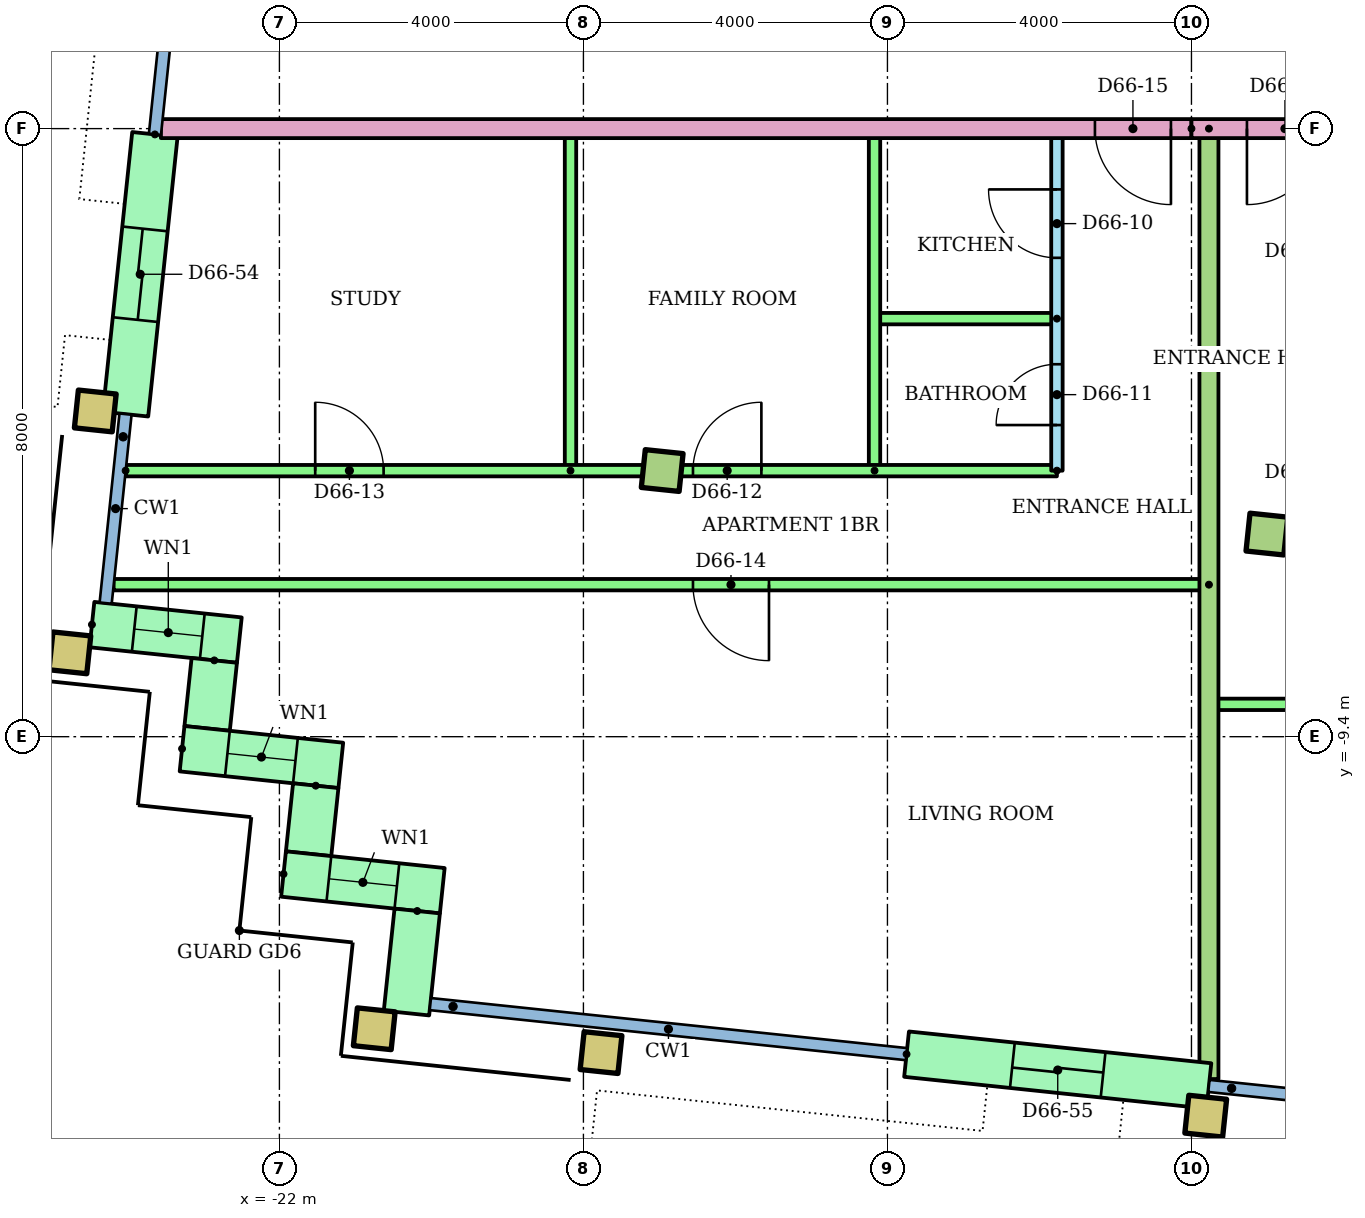
"""IFC4 building model, lengths in metres.
Left out: names, types, materials, properties, quantities, classifications, styles, units other than length and angle.
Written with IfcOpenShell. Run it as: python <this file> out.ifc"""

import sys

from ifc_helpers import new_model, si_unit, direction, frame, frame_2d, origin, origin_2d, place, context, subcontext, project, spatial, rectangle, hollow_rectangle, extrude, element, fill, save


model = new_model("IFC4")
c1 = context("Model", 3, precision=1e-05, world=origin(), true_north=direction((0.0, 1.0)))
c2 = subcontext(c1, "Body", "Model", "MODEL_VIEW")
j1 = project(units=[si_unit("LENGTHUNIT", "METRE"), si_unit("PLANEANGLEUNIT", "RADIAN")], contexts=[c1])
p1 = place(None, origin())
s1 = spatial("IfcSite", under=j1, at=p1, CompositionType="ELEMENT")
p2 = place(p1, origin())
s2 = spatial("IfcBuilding", under=s1, at=p2, CompositionType="ELEMENT")
p3 = place(p2, frame((0.0, 0.0, 256.3)))
s3 = spatial("IfcBuildingStorey", under=s2, at=p3, CompositionType="ELEMENT", Elevation=256.3)
for number, where, z_axis, x_axis in (
    (1, (-20.752, -13.243, 0.0), (0.0, 0.0, 1.0), (0.995, -0.105, 0.0)),
    (2, (-17.768, -13.556, 0.0), (0.0, 0.0, 1.0), (0.995, -0.105, 0.0)),
    (3, (-9.812, -14.392, 0.0), (0.0, 0.0, 1.0), (0.995, -0.105, 0.0)),
    (4, (-24.757, -8.297, 0.0), (0.0, 0.0, 1.0), (0.995, -0.105, 0.0)),
    (5, (-24.423, -5.115, 0.0), (0.0, 0.0, 1.0), (0.995, -0.105, 0.0)),
):
    element("IfcColumn", number, at=place(p3, frame(where, z_axis=z_axis, x_axis=x_axis)), inside=s3, PredefinedType="COLUMN", context=c2, shape_type="SweptSolid", body=[
        extrude(hollow_rectangle(XDim=0.5, YDim=0.5, WallThickness=0.025, at=origin_2d()), origin(), (0.0, 0.0, 1.0), 3.2),
    ])
for number, where, z_axis, x_axis in (
    (6, (-16.964, -5.898, 0.0), (0.0, 0.0, 1.0), (0.995, -0.105, 0.0)),
    (7, (-9.007, -6.735, 0.0), (0.0, 0.0, 1.0), (0.995, -0.105, 0.0)),
):
    element("IfcColumn", number, at=place(p3, frame(where, z_axis=z_axis, x_axis=x_axis)), inside=s3, PredefinedType="COLUMN", context=c2, shape_type="SweptSolid", body=[
        extrude(rectangle(XDim=0.5, YDim=0.5, at=origin_2d()), origin(), (0.0, 0.0, 1.0), 3.2),
    ])
p4 = place(p3, frame((-23.638, -1.476, 0.0), z_axis=(0.0, 0.0, 1.0), x_axis=(-0.104513052986, -0.994523514933, 0.0)))
e8 = element("IfcWall", 8, at=p4, inside=s3, PredefinedType="STANDARD", context=c2, shape_type="SweptSolid", body=[
    extrude(rectangle(XDim=3.7, YDim=0.6, at=frame_2d((1.85, 0.0))), origin(), (0.0, 0.0, 1.0), 2.92),
])
p5 = place(p4, frame((1.25, 0.0, 0.0)))
e9 = element("IfcOpeningElement", 9, at=p5, cuts=e8, PredefinedType="OPENING", context=c2, shape_type="SweptSolid", body=[
    extrude(rectangle(XDim=1.2, YDim=2.1, at=frame_2d((0.6, 1.05))), frame((0.0, 0.31, 0.0), z_axis=(0.0, -1.0, 0.0), x_axis=(1.0, 0.0, 0.0)), (0.0, 0.0, 1.0), 0.62),
])
p6 = place(p3, frame((-24.467, -7.925, 0.0), z_axis=(0.0, 0.0, 1.0), x_axis=(0.994521219184, -0.104534896528, 0.0)))
e10 = element("IfcWall", 10, at=p6, inside=s3, PredefinedType="STANDARD", context=c2, shape_type="SweptSolid", body=[
    extrude(rectangle(XDim=1.95, YDim=0.6, at=frame_2d((0.975, 0.0))), origin(), (0.0, 0.0, 1.0), 2.92),
])
p7 = place(p6, frame((0.56, 0.0, 0.9)))
e11 = element("IfcOpeningElement", 11, at=p7, cuts=e10, PredefinedType="OPENING", context=c2, shape_type="SweptSolid", body=[
    extrude(rectangle(XDim=0.9, YDim=1.5, at=frame_2d((0.45, 0.75))), frame((0.0, 0.31, 0.0), z_axis=(0.0, -1.0, 0.0), x_axis=(1.0, 0.0, 0.0)), (0.0, 0.0, 1.0), 0.62),
])
p8 = place(p3, frame((-22.857, -8.396, 0.0), z_axis=(0.0, 0.0, 1.0), x_axis=(-0.104444712852, -0.994530694326, 0.0)))
e12 = element("IfcWall", 12, at=p8, inside=s3, PredefinedType="STANDARD", context=c2, shape_type="SweptSolid", body=[
    extrude(rectangle(XDim=0.9, YDim=0.6, at=frame_2d((0.45, 0.0))), origin(), (0.0, 0.0, 1.0), 2.92),
])
p9 = place(p3, frame((-23.281, -9.558, 0.0), z_axis=(0.0, 0.0, 1.0), x_axis=(0.994523910136, -0.104509292252, 0.0)))
e13 = element("IfcWall", 13, at=p9, inside=s3, PredefinedType="STANDARD", context=c2, shape_type="SweptSolid", body=[
    extrude(rectangle(XDim=2.1, YDim=0.6, at=frame_2d((1.05, 0.0))), origin(), (0.0, 0.0, 1.0), 2.92),
])
p10 = place(p9, frame((0.6, 0.0, 0.9)))
e14 = element("IfcOpeningElement", 14, at=p10, cuts=e13, PredefinedType="OPENING", context=c2, shape_type="SweptSolid", body=[
    extrude(rectangle(XDim=0.9, YDim=1.5, at=frame_2d((0.45, 0.75))), frame((0.0, 0.31, 0.0), z_axis=(0.0, -1.0, 0.0), x_axis=(1.0, 0.0, 0.0)), (0.0, 0.0, 1.0), 0.62),
])
p11 = place(p3, frame((-21.522, -10.044, 0.0), z_axis=(0.0, 0.0, 1.0), x_axis=(-0.104416541099, -0.994533652495, 0.0)))
e15 = element("IfcWall", 15, at=p11, inside=s3, PredefinedType="STANDARD", context=c2, shape_type="SweptSolid", body=[
    extrude(rectangle(XDim=0.9, YDim=0.6, at=frame_2d((0.45, 0.0))), origin(), (0.0, 0.0, 1.0), 2.92),
])
p12 = place(p3, frame((-21.946, -11.207, 0.0), z_axis=(0.0, 0.0, 1.0), x_axis=(0.994511820899, -0.104624271047, 0.0)))
e16 = element("IfcWall", 16, at=p12, inside=s3, PredefinedType="STANDARD", context=c2, shape_type="SweptSolid", body=[
    extrude(rectangle(XDim=2.1, YDim=0.6, at=frame_2d((1.05, 0.0))), origin(), (0.0, 0.0, 1.0), 2.92),
])
p13 = place(p12, frame((0.6, 0.0, 0.9)))
e17 = element("IfcOpeningElement", 17, at=p13, cuts=e16, PredefinedType="OPENING", context=c2, shape_type="SweptSolid", body=[
    extrude(rectangle(XDim=0.9, YDim=1.5, at=frame_2d((0.45, 0.75))), frame((0.0, 0.31, 0.0), z_axis=(0.0, -1.0, 0.0), x_axis=(1.0, 0.0, 0.0)), (0.0, 0.0, 1.0), 0.62),
])
p14 = place(p3, frame((-20.187, -11.693, 0.0), z_axis=(0.0, 0.0, 1.0), x_axis=(-0.1043365026, -0.994542052517, 0.0)))
e18 = element("IfcWall", 18, at=p14, inside=s3, PredefinedType="STANDARD", context=c2, shape_type="SweptSolid", body=[
    extrude(rectangle(XDim=1.35, YDim=0.6, at=frame_2d((0.675, 0.0))), origin(), (0.0, 0.0, 1.0), 2.92),
])
p15 = place(p3, frame((-13.749, -13.576, 0.0), z_axis=(0.0, 0.0, 1.0), x_axis=(0.994519156568, -0.104554517933, 0.0)))
e19 = element("IfcWall", 19, at=p15, inside=s3, PredefinedType="STANDARD", context=c2, shape_type="SweptSolid", body=[
    extrude(rectangle(XDim=4.0, YDim=0.6, at=frame_2d((2.0, 0.0))), origin(), (0.0, 0.0, 1.0), 2.92),
])
p16 = place(p15, frame((1.4, 0.0, 0.0)))
e20 = element("IfcOpeningElement", 20, at=p16, cuts=e19, PredefinedType="OPENING", context=c2, shape_type="SweptSolid", body=[
    extrude(rectangle(XDim=1.2, YDim=2.1, at=frame_2d((0.6, 1.05))), frame((0.0, 0.31, 0.0), z_axis=(0.0, -1.0, 0.0), x_axis=(1.0, 0.0, 0.0)), (0.0, 0.0, 1.0), 0.62),
])
p17 = place(p3, frame((-11.77, -5.9, 0.0), z_axis=(0.0, 0.0, 1.0), x_axis=(0.0, 1.0, 0.0)))
e21 = element("IfcWall", 21, at=p17, inside=s3, PredefinedType="PARTITIONING", context=c2, shape_type="SweptSolid", body=[
    extrude(rectangle(XDim=4.5, YDim=0.15, at=frame_2d((2.25, 0.0))), origin(), (0.0, 0.0, 1.0), 2.4),
])
p18 = place(p17, frame((2.8, 0.0, 0.0)))
e22 = element("IfcOpeningElement", 22, at=p18, cuts=e21, PredefinedType="OPENING", context=c2, shape_type="SweptSolid", body=[
    extrude(rectangle(XDim=0.9, YDim=2.1, at=frame_2d((0.45, 1.05))), frame((0.0, 0.085, 0.0), z_axis=(0.0, -1.0, 0.0), x_axis=(1.0, 0.0, 0.0)), (0.0, 0.0, 1.0), 0.17),
])
p19 = place(p17, frame((0.6, 0.0, 0.0)))
e23 = element("IfcOpeningElement", 23, at=p19, cuts=e21, PredefinedType="OPENING", context=c2, shape_type="SweptSolid", body=[
    extrude(rectangle(XDim=0.8, YDim=2.1, at=frame_2d((0.4, 1.05))), frame((0.0, 0.085, 0.0), z_axis=(0.0, -1.0, 0.0), x_axis=(1.0, 0.0, 0.0)), (0.0, 0.0, 1.0), 0.17),
])
p20 = place(p3, frame((-11.77, -3.9, 0.0), z_axis=(0.0, 0.0, 1.0), x_axis=(-1.0, 0.0, 0.0)))
e24 = element("IfcWall", 24, at=p20, inside=s3, PredefinedType="PARTITIONING", context=c2, shape_type="SweptSolid", body=[
    extrude(rectangle(XDim=2.4, YDim=0.15, at=frame_2d((1.2, 0.0))), origin(), (0.0, 0.0, 1.0), 2.4),
])
for number, where, z_axis, x_axis in (
    (25, (-14.17, -5.9, 0.0), (0.0, 0.0, 1.0), (0.0, 1.0, 0.0)),
    (26, (-18.17, -5.9, 0.0), (0.0, 0.0, 1.0), (0.0, 1.0, 0.0)),
):
    element("IfcWall", number, at=place(p3, frame(where, z_axis=z_axis, x_axis=x_axis)), inside=s3, PredefinedType="PARTITIONING", context=c2, shape_type="SweptSolid", body=[
        extrude(rectangle(XDim=4.5, YDim=0.15, at=frame_2d((2.25, 0.0))), origin(), (0.0, 0.0, 1.0), 2.4),
    ])
p21 = place(p3, frame((-24.023, -5.9, 0.0)))
e27 = element("IfcWall", 27, at=p21, inside=s3, PredefinedType="PARTITIONING", context=c2, shape_type="SweptSolid", body=[
    extrude(rectangle(XDim=12.253, YDim=0.15, at=frame_2d((6.127, 0.0))), origin(), (0.0, 0.0, 1.0), 2.4),
])
p22 = place(p21, frame((7.465, 0.0, 0.0)))
e28 = element("IfcOpeningElement", 28, at=p22, cuts=e27, PredefinedType="OPENING", context=c2, shape_type="SweptSolid", body=[
    extrude(rectangle(XDim=0.9, YDim=2.1, at=frame_2d((0.45, 1.05))), frame((0.0, 0.085, 0.0), z_axis=(0.0, -1.0, 0.0), x_axis=(1.0, 0.0, 0.0)), (0.0, 0.0, 1.0), 0.17),
])
p23 = place(p21, frame((2.494, 0.0, 0.0)))
e29 = element("IfcOpeningElement", 29, at=p23, cuts=e27, PredefinedType="OPENING", context=c2, shape_type="SweptSolid", body=[
    extrude(rectangle(XDim=0.9, YDim=2.1, at=frame_2d((0.45, 1.05))), frame((0.0, 0.085, 0.0), z_axis=(0.0, -1.0, 0.0), x_axis=(1.0, 0.0, 0.0)), (0.0, 0.0, 1.0), 0.17),
])
p24 = place(p3, frame((-9.77, -7.4, 0.0), z_axis=(0.0, 0.0, 1.0), x_axis=(-1.0, 0.0, 0.0)))
e30 = element("IfcWall", 30, at=p24, inside=s3, PredefinedType="PARTITIONING", context=c2, shape_type="SweptSolid", body=[
    extrude(rectangle(XDim=14.411, YDim=0.15, at=frame_2d((7.206, 0.0))), origin(), (0.0, 0.0, 1.0), 2.4),
])
p25 = place(p24, frame((5.789, 0.0, 0.0)))
e31 = element("IfcOpeningElement", 31, at=p25, cuts=e30, PredefinedType="OPENING", context=c2, shape_type="SweptSolid", body=[
    extrude(rectangle(XDim=1.0, YDim=2.1, at=frame_2d((0.5, 1.05))), frame((0.0, 0.085, 0.0), z_axis=(0.0, -1.0, 0.0), x_axis=(1.0, 0.0, 0.0)), (0.0, 0.0, 1.0), 0.17),
])
p26 = place(p3, frame((14.098, -8.975, 0.0), z_axis=(0.0, 0.0, 1.0), x_axis=(-1.0, 0.0, 0.0)))
e32 = element("IfcWall", 32, at=p26, inside=s3, PredefinedType="PARTITIONING", context=c2, shape_type="SweptSolid", body=[
    extrude(rectangle(XDim=23.868, YDim=0.15, at=frame_2d((11.934, 0.0))), origin(), (0.0, 0.0, 1.0), 2.4),
])
p27 = place(p26, frame((21.429, 0.0, 0.0)))
e33 = element("IfcOpeningElement", 33, at=p27, cuts=e32, PredefinedType="OPENING", context=c2, shape_type="SweptSolid", body=[
    extrude(rectangle(XDim=0.9, YDim=2.1, at=frame_2d((0.45, 1.05))), frame((0.0, 0.085, 0.0), z_axis=(0.0, -1.0, 0.0), x_axis=(1.0, 0.0, 0.0)), (0.0, 0.0, 1.0), 0.17),
])
p28 = place(p26, frame((17.451, 0.0, 0.0)))
e34 = element("IfcOpeningElement", 34, at=p28, cuts=e32, PredefinedType="OPENING", context=c2, shape_type="SweptSolid", body=[
    extrude(rectangle(XDim=0.9, YDim=2.1, at=frame_2d((0.45, 1.05))), frame((0.0, 0.085, 0.0), z_axis=(0.0, -1.0, 0.0), x_axis=(1.0, 0.0, 0.0)), (0.0, 0.0, 1.0), 0.17),
])
p29 = place(p26, frame((13.473, 0.0, 0.0)))
e35 = element("IfcOpeningElement", 35, at=p29, cuts=e32, PredefinedType="OPENING", context=c2, shape_type="SweptSolid", body=[
    extrude(rectangle(XDim=0.9, YDim=2.1, at=frame_2d((0.45, 1.05))), frame((0.0, 0.085, 0.0), z_axis=(0.0, -1.0, 0.0), x_axis=(1.0, 0.0, 0.0)), (0.0, 0.0, 1.0), 0.17),
])
p30 = place(p26, frame((9.495, 0.0, 0.0)))
e36 = element("IfcOpeningElement", 36, at=p30, cuts=e32, PredefinedType="OPENING", context=c2, shape_type="SweptSolid", body=[
    extrude(rectangle(XDim=0.9, YDim=2.1, at=frame_2d((0.45, 1.05))), frame((0.0, 0.085, 0.0), z_axis=(0.0, -1.0, 0.0), x_axis=(1.0, 0.0, 0.0)), (0.0, 0.0, 1.0), 0.17),
])
p31 = place(p26, frame((3.478, 0.0, 0.0)))
e37 = element("IfcOpeningElement", 37, at=p31, cuts=e32, PredefinedType="OPENING", context=c2, shape_type="SweptSolid", body=[
    extrude(rectangle(XDim=1.0, YDim=2.1, at=frame_2d((0.5, 1.05))), frame((0.0, 0.085, 0.0), z_axis=(0.0, -1.0, 0.0), x_axis=(1.0, 0.0, 0.0)), (0.0, 0.0, 1.0), 0.17),
])
p32 = place(p3, frame((-9.77, -1.4, 0.0), z_axis=(0.0, 0.0, 1.0), x_axis=(0.0, -1.0, 0.0)))
e38 = element("IfcWall", 38, at=p32, inside=s3, PredefinedType="PARTITIONING", context=c2, shape_type="SweptSolid", body=[
    extrude(rectangle(XDim=12.504, YDim=0.25, at=frame_2d((6.252, 0.0))), origin(), (0.0, 0.0, 1.0), 2.4),
])
p33 = place(p3, frame((-10.0, -1.4, 0.0), z_axis=(0.0, 0.0, 1.0), x_axis=(-1.0, 0.0, 0.0)))
e39 = element("IfcWall", 39, at=p33, inside=s3, PredefinedType="PARTITIONING", context=c2, shape_type="SweptSolid", body=[
    extrude(rectangle(XDim=13.56, YDim=0.25, at=frame_2d((6.78, 0.0))), origin(), (0.0, 0.0, 1.0), 2.4),
])
p34 = place(p33, frame((0.27, 0.0, 0.0)))
e40 = element("IfcOpeningElement", 40, at=p34, cuts=e39, PredefinedType="OPENING", context=c2, shape_type="SweptSolid", body=[
    extrude(rectangle(XDim=1.0, YDim=2.1, at=frame_2d((0.5, 1.05))), frame((0.0, 0.135, 0.0), z_axis=(0.0, -1.0, 0.0), x_axis=(1.0, 0.0, 0.0)), (0.0, 0.0, 1.0), 0.27),
])
p35 = place(p3, frame((10.0, -1.4, 0.0), z_axis=(0.0, 0.0, 1.0), x_axis=(-1.0, 0.0, 0.0)))
e41 = element("IfcWall", 41, at=p35, inside=s3, PredefinedType="PARTITIONING", context=c2, shape_type="SweptSolid", body=[
    extrude(rectangle(XDim=20.0, YDim=0.25, at=frame_2d((10.0, 0.0))), origin(), (0.0, 0.0, 1.0), 2.4),
])
p36 = place(p35, frame((18.27, 0.0, 0.0)))
e42 = element("IfcOpeningElement", 42, at=p36, cuts=e41, PredefinedType="OPENING", context=c2, shape_type="SweptSolid", body=[
    extrude(rectangle(XDim=1.0, YDim=2.1, at=frame_2d((0.5, 1.05))), frame((0.0, 0.135, 0.0), z_axis=(0.0, -1.0, 0.0), x_axis=(1.0, 0.0, 0.0)), (0.0, 0.0, 1.0), 0.27),
])
p37 = place(p7, origin())
e43 = element("IfcWindow", 43, at=p37, inside=s3, PartitioningType="SINGLE_PANEL", PredefinedType="WINDOW", context=c2, shape_type="SweptSolid", body=[
    extrude(rectangle(XDim=0.9, YDim=1.5, at=frame_2d((0.45, 0.75))), frame((0.0, 0.03, 0.0), z_axis=(0.0, -1.0, 0.0), x_axis=(1.0, 0.0, 0.0)), (0.0, 0.0, 1.0), 0.06),
])
fill(e11, e43)
p38 = place(p10, origin())
e44 = element("IfcWindow", 44, at=p38, inside=s3, PartitioningType="SINGLE_PANEL", PredefinedType="WINDOW", context=c2, shape_type="SweptSolid", body=[
    extrude(rectangle(XDim=0.9, YDim=1.5, at=frame_2d((0.45, 0.75))), frame((0.0, 0.03, 0.0), z_axis=(0.0, -1.0, 0.0), x_axis=(1.0, 0.0, 0.0)), (0.0, 0.0, 1.0), 0.06),
])
fill(e14, e44)
p39 = place(p13, origin())
e45 = element("IfcWindow", 45, at=p39, inside=s3, PartitioningType="SINGLE_PANEL", PredefinedType="WINDOW", context=c2, shape_type="SweptSolid", body=[
    extrude(rectangle(XDim=0.9, YDim=1.5, at=frame_2d((0.45, 0.75))), frame((0.0, 0.03, 0.0), z_axis=(0.0, -1.0, 0.0), x_axis=(1.0, 0.0, 0.0)), (0.0, 0.0, 1.0), 0.06),
])
fill(e17, e45)
p40 = place(p18, origin())
e46 = element("IfcDoor", 46, at=p40, inside=s3, OperationType="SINGLE_SWING_RIGHT", PredefinedType="DOOR", context=c2, shape_type="SweptSolid", body=[
    extrude(rectangle(XDim=0.9, YDim=2.1, at=frame_2d((0.45, 1.05))), frame((0.0, 0.025, 0.0), z_axis=(0.0, -1.0, 0.0), x_axis=(1.0, 0.0, 0.0)), (0.0, 0.0, 1.0), 0.05),
])
fill(e22, e46)
p41 = place(p19, origin())
e47 = element("IfcDoor", 47, at=p41, inside=s3, OperationType="SINGLE_SWING_LEFT", PredefinedType="DOOR", context=c2, shape_type="SweptSolid", body=[
    extrude(rectangle(XDim=0.8, YDim=2.1, at=frame_2d((0.4, 1.05))), frame((0.0, 0.025, 0.0), z_axis=(0.0, -1.0, 0.0), x_axis=(1.0, 0.0, 0.0)), (0.0, 0.0, 1.0), 0.05),
])
fill(e23, e47)
p42 = place(p22, origin())
e48 = element("IfcDoor", 48, at=p42, inside=s3, OperationType="SINGLE_SWING_RIGHT", PredefinedType="DOOR", context=c2, shape_type="SweptSolid", body=[
    extrude(rectangle(XDim=0.9, YDim=2.1, at=frame_2d((0.45, 1.05))), frame((0.0, 0.025, 0.0), z_axis=(0.0, -1.0, 0.0), x_axis=(1.0, 0.0, 0.0)), (0.0, 0.0, 1.0), 0.05),
])
fill(e28, e48)
p43 = place(p23, origin())
e49 = element("IfcDoor", 49, at=p43, inside=s3, OperationType="SINGLE_SWING_LEFT", PredefinedType="DOOR", context=c2, shape_type="SweptSolid", body=[
    extrude(rectangle(XDim=0.9, YDim=2.1, at=frame_2d((0.45, 1.05))), frame((0.0, 0.025, 0.0), z_axis=(0.0, -1.0, 0.0), x_axis=(1.0, 0.0, 0.0)), (0.0, 0.0, 1.0), 0.05),
])
fill(e29, e49)
p44 = place(p25, origin())
e50 = element("IfcDoor", 50, at=p44, inside=s3, OperationType="SINGLE_SWING_LEFT", PredefinedType="DOOR", context=c2, shape_type="SweptSolid", body=[
    extrude(rectangle(XDim=1.0, YDim=2.1, at=frame_2d((0.5, 1.05))), frame((0.0, 0.025, 0.0), z_axis=(0.0, -1.0, 0.0), x_axis=(1.0, 0.0, 0.0)), (0.0, 0.0, 1.0), 0.05),
])
fill(e31, e50)
p45 = place(p34, origin())
e51 = element("IfcDoor", 51, at=p45, inside=s3, OperationType="SINGLE_SWING_LEFT", PredefinedType="DOOR", context=c2, shape_type="SweptSolid", body=[
    extrude(rectangle(XDim=1.0, YDim=2.1, at=frame_2d((0.5, 1.05))), frame((0.0, 0.025, 0.0), z_axis=(0.0, -1.0, 0.0), x_axis=(1.0, 0.0, 0.0)), (0.0, 0.0, 1.0), 0.05),
])
fill(e40, e51)
p46 = place(p36, origin())
e52 = element("IfcDoor", 52, at=p46, inside=s3, OperationType="SINGLE_SWING_RIGHT", PredefinedType="DOOR", context=c2, shape_type="SweptSolid", body=[
    extrude(rectangle(XDim=1.0, YDim=2.1, at=frame_2d((0.5, 1.05))), frame((0.0, 0.025, 0.0), z_axis=(0.0, -1.0, 0.0), x_axis=(1.0, 0.0, 0.0)), (0.0, 0.0, 1.0), 0.05),
])
fill(e42, e52)
p47 = place(p5, origin())
e53 = element("IfcDoor", 53, at=p47, inside=s3, OperationType="SLIDING_TO_LEFT", PredefinedType="DOOR", context=c2, shape_type="SweptSolid", body=[
    extrude(rectangle(XDim=1.2, YDim=2.1, at=frame_2d((0.6, 1.05))), frame((0.0, 0.025, 0.0), z_axis=(0.0, -1.0, 0.0), x_axis=(1.0, 0.0, 0.0)), (0.0, 0.0, 1.0), 0.05),
])
fill(e9, e53)
p48 = place(p16, origin())
e54 = element("IfcDoor", 54, at=p48, inside=s3, OperationType="SLIDING_TO_LEFT", PredefinedType="DOOR", context=c2, shape_type="SweptSolid", body=[
    extrude(rectangle(XDim=1.2, YDim=2.1, at=frame_2d((0.6, 1.05))), frame((0.0, 0.025, 0.0), z_axis=(0.0, -1.0, 0.0), x_axis=(1.0, 0.0, 0.0)), (0.0, 0.0, 1.0), 0.05),
])
fill(e20, e54)
save(model, sys.argv[1])
